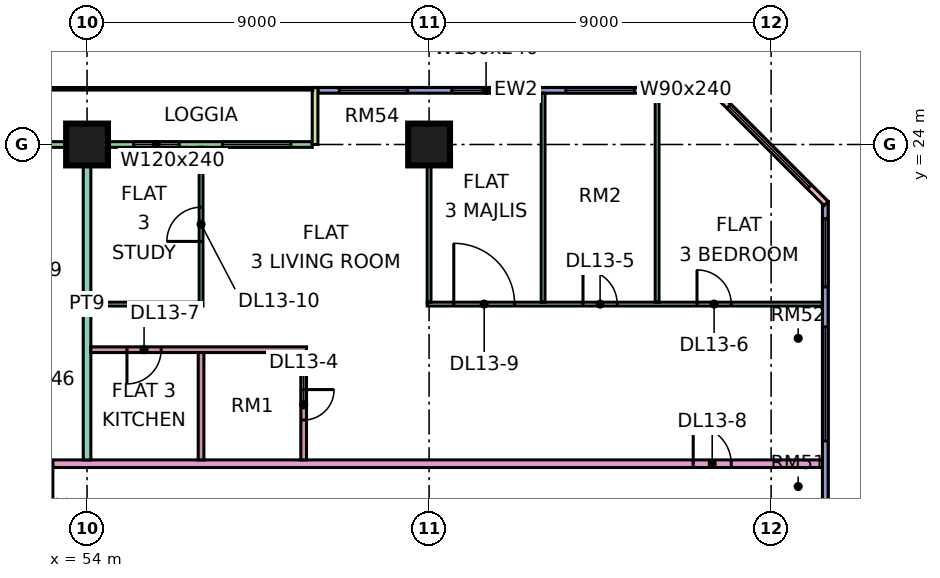
"""IFC4 building model, lengths in metres.
Left out: names, types, materials, properties, quantities, classifications, styles, units other than length and angle.
Written with IfcOpenShell. Run it as: python <this file> out.ifc"""

import sys

from ifc_helpers import new_model, si_unit, direction, frame, frame_2d, origin, origin_2d, place, context, subcontext, project, spatial, rectangle, extrude, element, fill, save


model = new_model("IFC4")
c1 = context("Model", 3, precision=1e-05, world=origin(), true_north=direction((0.0, 1.0)))
c2 = subcontext(c1, "Body", "Model", "MODEL_VIEW")
j1 = project(units=[si_unit("LENGTHUNIT", "METRE"), si_unit("PLANEANGLEUNIT", "RADIAN")], contexts=[c1])
p1 = place(None, origin())
s1 = spatial("IfcSite", under=j1, at=p1, CompositionType="ELEMENT")
p2 = place(p1, origin())
s2 = spatial("IfcBuilding", under=s1, at=p2, CompositionType="ELEMENT")
p3 = place(p2, frame((0.0, 0.0, 63.9)))
s3 = spatial("IfcBuildingStorey", under=s2, at=p3, CompositionType="ELEMENT", Elevation=63.9)
for number, where, z_axis, x_axis in (
    (1, (54.0, 24.0, 0.0), (0.0, 0.0, 1.0), (1.0, 0.0, 0.0)),
    (2, (63.0, 24.0, 0.0), (0.0, 0.0, 1.0), (1.0, 0.0, 0.0)),
):
    element("IfcColumn", number, at=place(p3, frame(where, z_axis=z_axis, x_axis=x_axis)), inside=s3, PredefinedType="COLUMN", context=c2, shape_type="SweptSolid", body=[
        extrude(rectangle(XDim=1.1, YDim=1.1, at=origin_2d()), origin(), (0.0, 0.0, 1.0), 3.75),
    ])
p4 = place(p3, frame((70.5, 25.425, 0.0), z_axis=(0.0, 0.0, 1.0), x_axis=(-1.0, 0.0, 0.0)))
e3 = element("IfcWall", 3, at=p4, inside=s3, PredefinedType="SOLIDWALL", context=c2, shape_type="SweptSolid", body=[
    extrude(rectangle(XDim=10.425, YDim=0.15, at=frame_2d((5.212, 0.0))), origin(), (0.0, 0.0, 1.0), 3.35),
])
p5 = place(p4, frame((0.3, 0.0, 0.45)))
e4 = element("IfcOpeningElement", 4, at=p5, cuts=e3, PredefinedType="OPENING", context=c2, shape_type="SweptSolid", body=[
    extrude(rectangle(XDim=0.9, YDim=2.4, at=frame_2d((0.45, 1.2))), frame((0.0, 0.085, 0.0), z_axis=(0.0, -1.0, 0.0), x_axis=(1.0, 0.0, 0.0)), (0.0, 0.0, 1.0), 0.17),
])
p6 = place(p4, frame((2.1, 0.0, 0.45)))
e5 = element("IfcOpeningElement", 5, at=p6, cuts=e3, PredefinedType="OPENING", context=c2, shape_type="SweptSolid", body=[
    extrude(rectangle(XDim=1.8, YDim=2.4, at=frame_2d((0.9, 1.2))), frame((0.0, 0.085, 0.0), z_axis=(0.0, -1.0, 0.0), x_axis=(1.0, 0.0, 0.0)), (0.0, 0.0, 1.0), 0.17),
])
p7 = place(p4, frame((5.1, 0.0, 0.45)))
e6 = element("IfcOpeningElement", 6, at=p7, cuts=e3, PredefinedType="OPENING", context=c2, shape_type="SweptSolid", body=[
    extrude(rectangle(XDim=1.8, YDim=2.4, at=frame_2d((0.9, 1.2))), frame((0.0, 0.085, 0.0), z_axis=(0.0, -1.0, 0.0), x_axis=(1.0, 0.0, 0.0)), (0.0, 0.0, 1.0), 0.17),
])
p8 = place(p4, frame((8.062, 0.0, 0.45)))
e7 = element("IfcOpeningElement", 7, at=p8, cuts=e3, PredefinedType="OPENING", context=c2, shape_type="SweptSolid", body=[
    extrude(rectangle(XDim=1.8, YDim=2.4, at=frame_2d((0.9, 1.2))), frame((0.0, 0.085, 0.0), z_axis=(0.0, -1.0, 0.0), x_axis=(1.0, 0.0, 0.0)), (0.0, 0.0, 1.0), 0.17),
])
p9 = place(p3, frame((59.925, 24.0, 0.0), z_axis=(0.0, 0.0, 1.0), x_axis=(-1.0, 0.0, 0.0)))
e8 = element("IfcWall", 8, at=p9, inside=s3, PredefinedType="SOLIDWALL", context=c2, shape_type="SweptSolid", body=[
    extrude(rectangle(XDim=11.85, YDim=0.15, at=frame_2d((5.925, 0.0))), origin(), (0.0, 0.0, 1.0), 3.35),
])
p10 = place(p9, frame((0.562, 0.0, 0.45)))
e9 = element("IfcOpeningElement", 9, at=p10, cuts=e8, PredefinedType="OPENING", context=c2, shape_type="SweptSolid", body=[
    extrude(rectangle(XDim=1.8, YDim=2.4, at=frame_2d((0.9, 1.2))), frame((0.0, 0.085, 0.0), z_axis=(0.0, -1.0, 0.0), x_axis=(1.0, 0.0, 0.0)), (0.0, 0.0, 1.0), 0.17),
])
p11 = place(p9, frame((3.5, 0.0, 0.45)))
e10 = element("IfcOpeningElement", 10, at=p11, cuts=e8, PredefinedType="OPENING", context=c2, shape_type="SweptSolid", body=[
    extrude(rectangle(XDim=1.2, YDim=2.4, at=frame_2d((0.6, 1.2))), frame((0.0, 0.085, 0.0), z_axis=(0.0, -1.0, 0.0), x_axis=(1.0, 0.0, 0.0)), (0.0, 0.0, 1.0), 0.17),
])
p12 = place(p9, frame((7.113, 0.0, 0.45)))
e11 = element("IfcOpeningElement", 11, at=p12, cuts=e8, PredefinedType="OPENING", context=c2, shape_type="SweptSolid", body=[
    extrude(rectangle(XDim=4.2, YDim=2.4, at=frame_2d((2.1, 1.2))), frame((0.0, 0.085, 0.0), z_axis=(0.0, -1.0, 0.0), x_axis=(1.0, 0.0, 0.0)), (0.0, 0.0, 1.0), 0.17),
])
p13 = place(p3, frame((60.0, 25.5, 0.0), z_axis=(0.0, 0.0, 1.0), x_axis=(0.0, -1.0, 0.0)))
e12 = element("IfcWall", 12, at=p13, inside=s3, PredefinedType="SOLIDWALL", context=c2, shape_type="SweptSolid", body=[
    extrude(rectangle(XDim=1.5, YDim=0.15, at=frame_2d((0.75, 0.0))), origin(), (0.0, 0.0, 1.0), 3.35),
])
p14 = place(p3, frame((73.425, 12.075, 0.0), z_axis=(0.0, 0.0, 1.0), x_axis=(0.0, 1.0, 0.0)))
e13 = element("IfcWall", 13, at=p14, inside=s3, PredefinedType="SOLIDWALL", context=c2, shape_type="SweptSolid", body=[
    extrude(rectangle(XDim=10.425, YDim=0.15, at=frame_2d((5.212, 0.0))), origin(), (0.0, 0.0, 1.0), 3.35),
])
p15 = place(p14, frame((4.125, 0.0, 0.45)))
e14 = element("IfcOpeningElement", 14, at=p15, cuts=e13, PredefinedType="OPENING", context=c2, shape_type="SweptSolid", body=[
    extrude(rectangle(XDim=3.0, YDim=2.4, at=frame_2d((1.5, 1.2))), frame((0.0, 0.085, 0.0), z_axis=(0.0, -1.0, 0.0), x_axis=(1.0, 0.0, 0.0)), (0.0, 0.0, 1.0), 0.17),
])
p16 = place(p14, frame((8.175, 0.0, 0.45)))
e15 = element("IfcOpeningElement", 15, at=p16, cuts=e13, PredefinedType="OPENING", context=c2, shape_type="SweptSolid", body=[
    extrude(rectangle(XDim=1.8, YDim=2.4, at=frame_2d((0.9, 1.2))), frame((0.0, 0.085, 0.0), z_axis=(0.0, -1.0, 0.0), x_axis=(1.0, 0.0, 0.0)), (0.0, 0.0, 1.0), 0.17),
])
p17 = place(p3, frame((73.447, 22.447, 0.0), z_axis=(0.0, 0.0, 1.0), x_axis=(-0.707106781187, 0.707106781187, 0.0)))
e16 = element("IfcWall", 16, at=p17, inside=s3, PredefinedType="SOLIDWALL", context=c2, shape_type="SweptSolid", body=[
    extrude(rectangle(XDim=4.243, YDim=0.15, at=frame_2d((2.121, 0.0))), origin(), (0.0, 0.0, 1.0), 3.35),
])
p18 = place(p17, frame((0.621, 0.0, 0.45)))
e17 = element("IfcOpeningElement", 17, at=p18, cuts=e16, PredefinedType="OPENING", context=c2, shape_type="SweptSolid", body=[
    extrude(rectangle(XDim=3.0, YDim=2.4, at=frame_2d((1.5, 1.2))), frame((0.0, 0.085, 0.0), z_axis=(0.0, -1.0, 0.0), x_axis=(1.0, 0.0, 0.0)), (0.0, 0.0, 1.0), 0.17),
])
p19 = place(p3, frame((51.225, 15.6, 0.0), z_axis=(0.0, 0.0, 1.0), x_axis=(1.0, 0.0, 0.0)))
e18 = element("IfcWall", 18, at=p19, inside=s3, PredefinedType="PARTITIONING", context=c2, shape_type="SweptSolid", body=[
    extrude(rectangle(XDim=22.125, YDim=0.2, at=frame_2d((11.062, 0.0))), origin(), (0.0, 0.0, 1.0), 3.35),
])
p20 = place(p19, frame((18.725, 0.0, 0.0)))
e19 = element("IfcOpeningElement", 19, at=p20, cuts=e18, PredefinedType="OPENING", context=c2, shape_type="SweptSolid", body=[
    extrude(rectangle(XDim=1.0, YDim=2.1, at=frame_2d((0.5, 1.05))), frame((0.0, 0.11, 0.0), z_axis=(0.0, -1.0, 0.0), x_axis=(1.0, 0.0, 0.0)), (0.0, 0.0, 1.0), 0.22),
])
p21 = place(p19, frame((0.875, 0.0, 0.0)))
e20 = element("IfcOpeningElement", 20, at=p21, cuts=e18, PredefinedType="OPENING", context=c2, shape_type="SweptSolid", body=[
    extrude(rectangle(XDim=1.0, YDim=2.1, at=frame_2d((0.5, 1.05))), frame((0.0, 0.11, 0.0), z_axis=(0.0, -1.0, 0.0), x_axis=(1.0, 0.0, 0.0)), (0.0, 0.0, 1.0), 0.22),
])
p22 = place(p3, frame((54.0, 15.7, 0.0), z_axis=(0.0, 0.0, 1.0), x_axis=(0.0, 1.0, 0.0)))
e21 = element("IfcWall", 21, at=p22, inside=s3, PredefinedType="PARTITIONING", context=c2, shape_type="SweptSolid", body=[
    extrude(rectangle(XDim=8.226, YDim=0.2, at=frame_2d((4.113, 0.0))), origin(), (0.0, 0.0, 1.0), 3.35),
])
p23 = place(p3, frame((54.1, 18.6, 0.0), z_axis=(0.0, 0.0, 1.0), x_axis=(1.0, 0.0, 0.0)))
e22 = element("IfcWall", 22, at=p23, inside=s3, PredefinedType="PARTITIONING", context=c2, shape_type="SweptSolid", body=[
    extrude(rectangle(XDim=5.675, YDim=0.15, at=frame_2d((2.837, 0.0))), origin(), (0.0, 0.0, 1.0), 3.35),
])
p24 = place(p23, frame((0.95, 0.0, 0.0)))
e23 = element("IfcOpeningElement", 23, at=p24, cuts=e22, PredefinedType="OPENING", context=c2, shape_type="SweptSolid", body=[
    extrude(rectangle(XDim=0.9, YDim=2.1, at=frame_2d((0.45, 1.05))), frame((0.0, 0.085, 0.0), z_axis=(0.0, -1.0, 0.0), x_axis=(1.0, 0.0, 0.0)), (0.0, 0.0, 1.0), 0.17),
])
p25 = place(p3, frame((54.1, 19.8, 0.0), z_axis=(0.0, 0.0, 1.0), x_axis=(1.0, 0.0, 0.0)))
e24 = element("IfcWall", 24, at=p25, inside=s3, PredefinedType="PARTITIONING", context=c2, shape_type="SweptSolid", body=[
    extrude(rectangle(XDim=2.85, YDim=0.1, at=frame_2d((1.425, 0.0))), origin(), (0.0, 0.0, 1.0), 3.35),
])
p26 = place(p3, frame((57.0, 15.7, 0.0), z_axis=(0.0, 0.0, 1.0), x_axis=(0.0, 1.0, 0.0)))
e25 = element("IfcWall", 25, at=p26, inside=s3, PredefinedType="PARTITIONING", context=c2, shape_type="SweptSolid", body=[
    extrude(rectangle(XDim=2.825, YDim=0.15, at=frame_2d((1.413, 0.0))), origin(), (0.0, 0.0, 1.0), 3.35),
])
p27 = place(p3, frame((57.0, 19.75, 0.0), z_axis=(0.0, 0.0, 1.0), x_axis=(0.0, 1.0, 0.0)))
e26 = element("IfcWall", 26, at=p27, inside=s3, PredefinedType="PARTITIONING", context=c2, shape_type="SweptSolid", body=[
    extrude(rectangle(XDim=4.176, YDim=0.1, at=frame_2d((2.088, 0.0))), origin(), (0.0, 0.0, 1.0), 3.35),
])
p28 = place(p27, frame((1.7, 0.0, 0.0)))
e27 = element("IfcOpeningElement", 27, at=p28, cuts=e26, PredefinedType="OPENING", context=c2, shape_type="SweptSolid", body=[
    extrude(rectangle(XDim=0.9, YDim=2.1, at=frame_2d((0.45, 1.05))), frame((0.0, 0.06, 0.0), z_axis=(0.0, -1.0, 0.0), x_axis=(1.0, 0.0, 0.0)), (0.0, 0.0, 1.0), 0.12),
])
p29 = place(p3, frame((59.7, 15.7, 0.0), z_axis=(0.0, 0.0, 1.0), x_axis=(0.0, 1.0, 0.0)))
e28 = element("IfcWall", 28, at=p29, inside=s3, PredefinedType="PARTITIONING", context=c2, shape_type="SweptSolid", body=[
    extrude(rectangle(XDim=2.825, YDim=0.15, at=frame_2d((1.413, 0.0))), origin(), (0.0, 0.0, 1.0), 3.35),
])
p30 = place(p29, frame((1.05, 0.0, 0.0)))
e29 = element("IfcOpeningElement", 29, at=p30, cuts=e28, PredefinedType="OPENING", context=c2, shape_type="SweptSolid", body=[
    extrude(rectangle(XDim=0.8, YDim=2.1, at=frame_2d((0.4, 1.05))), frame((0.0, 0.085, 0.0), z_axis=(0.0, -1.0, 0.0), x_axis=(1.0, 0.0, 0.0)), (0.0, 0.0, 1.0), 0.17),
])
p31 = place(p3, frame((62.95, 19.8, 0.0), z_axis=(0.0, 0.0, 1.0), x_axis=(1.0, 0.0, 0.0)))
e30 = element("IfcWall", 30, at=p31, inside=s3, PredefinedType="PARTITIONING", context=c2, shape_type="SweptSolid", body=[
    extrude(rectangle(XDim=10.4, YDim=0.1, at=frame_2d((5.2, 0.0))), origin(), (0.0, 0.0, 1.0), 3.35),
])
p32 = place(p31, frame((4.1, 0.0, 0.0)))
e31 = element("IfcOpeningElement", 31, at=p32, cuts=e30, PredefinedType="OPENING", context=c2, shape_type="SweptSolid", body=[
    extrude(rectangle(XDim=0.9, YDim=2.1, at=frame_2d((0.45, 1.05))), frame((0.0, 0.06, 0.0), z_axis=(0.0, -1.0, 0.0), x_axis=(1.0, 0.0, 0.0)), (0.0, 0.0, 1.0), 0.12),
])
p33 = place(p31, frame((7.1, 0.0, 0.0)))
e32 = element("IfcOpeningElement", 32, at=p33, cuts=e30, PredefinedType="OPENING", context=c2, shape_type="SweptSolid", body=[
    extrude(rectangle(XDim=0.9, YDim=2.1, at=frame_2d((0.45, 1.05))), frame((0.0, 0.06, 0.0), z_axis=(0.0, -1.0, 0.0), x_axis=(1.0, 0.0, 0.0)), (0.0, 0.0, 1.0), 0.12),
])
p34 = place(p31, frame((0.7, 0.0, 0.0)))
e33 = element("IfcOpeningElement", 33, at=p34, cuts=e30, PredefinedType="OPENING", context=c2, shape_type="SweptSolid", body=[
    extrude(rectangle(XDim=1.6, YDim=2.1, at=frame_2d((0.8, 1.05))), frame((0.0, 0.06, 0.0), z_axis=(0.0, -1.0, 0.0), x_axis=(1.0, 0.0, 0.0)), (0.0, 0.0, 1.0), 0.12),
])
p35 = place(p3, frame((63.0, 19.85, 0.0), z_axis=(0.0, 0.0, 1.0), x_axis=(0.0, 1.0, 0.0)))
e34 = element("IfcWall", 34, at=p35, inside=s3, PredefinedType="PARTITIONING", context=c2, shape_type="SweptSolid", body=[
    extrude(rectangle(XDim=4.15, YDim=0.1, at=frame_2d((2.075, 0.0))), origin(), (0.0, 0.0, 1.0), 3.35),
])
for number, where, z_axis, x_axis in (
    (35, (66.0, 19.85, 0.0), (0.0, 0.0, 1.0), (0.0, 1.0, 0.0)),
    (36, (69.0, 19.85, 0.0), (0.0, 0.0, 1.0), (0.0, 1.0, 0.0)),
):
    element("IfcWall", number, at=place(p3, frame(where, z_axis=z_axis, x_axis=x_axis)), inside=s3, PredefinedType="PARTITIONING", context=c2, shape_type="SweptSolid", body=[
        extrude(rectangle(XDim=5.501, YDim=0.1, at=frame_2d((2.75, 0.0))), origin(), (0.0, 0.0, 1.0), 3.35),
    ])
p36 = place(p5, origin())
e37 = element("IfcWindow", 37, at=p36, inside=s3, PartitioningType="SINGLE_PANEL", PredefinedType="WINDOW", context=c2, shape_type="SweptSolid", body=[
    extrude(rectangle(XDim=0.9, YDim=2.4, at=frame_2d((0.45, 1.2))), frame((0.0, 0.03, 0.0), z_axis=(0.0, -1.0, 0.0), x_axis=(1.0, 0.0, 0.0)), (0.0, 0.0, 1.0), 0.06),
])
fill(e4, e37)
p37 = place(p6, origin())
e38 = element("IfcWindow", 38, at=p37, inside=s3, PartitioningType="SINGLE_PANEL", PredefinedType="WINDOW", context=c2, shape_type="SweptSolid", body=[
    extrude(rectangle(XDim=1.8, YDim=2.4, at=frame_2d((0.9, 1.2))), frame((0.0, 0.03, 0.0), z_axis=(0.0, -1.0, 0.0), x_axis=(1.0, 0.0, 0.0)), (0.0, 0.0, 1.0), 0.06),
])
fill(e5, e38)
p38 = place(p7, origin())
e39 = element("IfcWindow", 39, at=p38, inside=s3, PartitioningType="SINGLE_PANEL", PredefinedType="WINDOW", context=c2, shape_type="SweptSolid", body=[
    extrude(rectangle(XDim=1.8, YDim=2.4, at=frame_2d((0.9, 1.2))), frame((0.0, 0.03, 0.0), z_axis=(0.0, -1.0, 0.0), x_axis=(1.0, 0.0, 0.0)), (0.0, 0.0, 1.0), 0.06),
])
fill(e6, e39)
p39 = place(p8, origin())
e40 = element("IfcWindow", 40, at=p39, inside=s3, PartitioningType="SINGLE_PANEL", PredefinedType="WINDOW", context=c2, shape_type="SweptSolid", body=[
    extrude(rectangle(XDim=1.8, YDim=2.4, at=frame_2d((0.9, 1.2))), frame((0.0, 0.03, 0.0), z_axis=(0.0, -1.0, 0.0), x_axis=(1.0, 0.0, 0.0)), (0.0, 0.0, 1.0), 0.06),
])
fill(e7, e40)
p40 = place(p10, origin())
e41 = element("IfcWindow", 41, at=p40, inside=s3, PartitioningType="SINGLE_PANEL", PredefinedType="WINDOW", context=c2, shape_type="SweptSolid", body=[
    extrude(rectangle(XDim=1.8, YDim=2.4, at=frame_2d((0.9, 1.2))), frame((0.0, 0.03, 0.0), z_axis=(0.0, -1.0, 0.0), x_axis=(1.0, 0.0, 0.0)), (0.0, 0.0, 1.0), 0.06),
])
fill(e9, e41)
p41 = place(p11, origin())
e42 = element("IfcWindow", 42, at=p41, inside=s3, PartitioningType="SINGLE_PANEL", PredefinedType="WINDOW", context=c2, shape_type="SweptSolid", body=[
    extrude(rectangle(XDim=1.2, YDim=2.4, at=frame_2d((0.6, 1.2))), frame((0.0, 0.03, 0.0), z_axis=(0.0, -1.0, 0.0), x_axis=(1.0, 0.0, 0.0)), (0.0, 0.0, 1.0), 0.06),
])
fill(e10, e42)
p42 = place(p15, origin())
e43 = element("IfcWindow", 43, at=p42, inside=s3, PartitioningType="SINGLE_PANEL", PredefinedType="WINDOW", context=c2, shape_type="SweptSolid", body=[
    extrude(rectangle(XDim=3.0, YDim=2.4, at=frame_2d((1.5, 1.2))), frame((0.0, 0.03, 0.0), z_axis=(0.0, -1.0, 0.0), x_axis=(1.0, 0.0, 0.0)), (0.0, 0.0, 1.0), 0.06),
])
fill(e14, e43)
p43 = place(p16, origin())
e44 = element("IfcWindow", 44, at=p43, inside=s3, PartitioningType="SINGLE_PANEL", PredefinedType="WINDOW", context=c2, shape_type="SweptSolid", body=[
    extrude(rectangle(XDim=1.8, YDim=2.4, at=frame_2d((0.9, 1.2))), frame((0.0, 0.03, 0.0), z_axis=(0.0, -1.0, 0.0), x_axis=(1.0, 0.0, 0.0)), (0.0, 0.0, 1.0), 0.06),
])
fill(e15, e44)
p44 = place(p18, origin())
e45 = element("IfcWindow", 45, at=p44, inside=s3, PartitioningType="SINGLE_PANEL", PredefinedType="WINDOW", context=c2, shape_type="SweptSolid", body=[
    extrude(rectangle(XDim=3.0, YDim=2.4, at=frame_2d((1.5, 1.2))), frame((0.0, 0.03, 0.0), z_axis=(0.0, -1.0, 0.0), x_axis=(1.0, 0.0, 0.0)), (0.0, 0.0, 1.0), 0.06),
])
fill(e17, e45)
p45 = place(p30, origin())
e46 = element("IfcDoor", 46, at=p45, inside=s3, OperationType="SINGLE_SWING_RIGHT", PredefinedType="DOOR", context=c2, shape_type="SweptSolid", body=[
    extrude(rectangle(XDim=0.8, YDim=2.1, at=frame_2d((0.4, 1.05))), frame((0.0, 0.025, 0.0), z_axis=(0.0, -1.0, 0.0), x_axis=(1.0, 0.0, 0.0)), (0.0, 0.0, 1.0), 0.05),
])
fill(e29, e46)
p46 = place(p32, origin())
e47 = element("IfcDoor", 47, at=p46, inside=s3, OperationType="SINGLE_SWING_LEFT", PredefinedType="DOOR", context=c2, shape_type="SweptSolid", body=[
    extrude(rectangle(XDim=0.9, YDim=2.1, at=frame_2d((0.45, 1.05))), frame((0.0, 0.025, 0.0), z_axis=(0.0, -1.0, 0.0), x_axis=(1.0, 0.0, 0.0)), (0.0, 0.0, 1.0), 0.05),
])
fill(e31, e47)
p47 = place(p33, origin())
e48 = element("IfcDoor", 48, at=p47, inside=s3, OperationType="SINGLE_SWING_LEFT", PredefinedType="DOOR", context=c2, shape_type="SweptSolid", body=[
    extrude(rectangle(XDim=0.9, YDim=2.1, at=frame_2d((0.45, 1.05))), frame((0.0, 0.025, 0.0), z_axis=(0.0, -1.0, 0.0), x_axis=(1.0, 0.0, 0.0)), (0.0, 0.0, 1.0), 0.05),
])
fill(e32, e48)
p48 = place(p24, frame((0.9, 0.0, 0.0), z_axis=(0.0, 0.0, 1.0), x_axis=(-1.0, 0.0, 0.0)))
e49 = element("IfcDoor", 49, at=p48, inside=s3, OperationType="SINGLE_SWING_LEFT", PredefinedType="DOOR", context=c2, shape_type="SweptSolid", body=[
    extrude(rectangle(XDim=0.9, YDim=2.1, at=frame_2d((0.45, 1.05))), frame((0.0, 0.025, 0.0), z_axis=(0.0, -1.0, 0.0), x_axis=(1.0, 0.0, 0.0)), (0.0, 0.0, 1.0), 0.05),
])
fill(e23, e49)
p49 = place(p20, origin())
e50 = element("IfcDoor", 50, at=p49, inside=s3, OperationType="SINGLE_SWING_LEFT", PredefinedType="DOOR", context=c2, shape_type="SweptSolid", body=[
    extrude(rectangle(XDim=1.0, YDim=2.1, at=frame_2d((0.5, 1.05))), frame((0.0, 0.025, 0.0), z_axis=(0.0, -1.0, 0.0), x_axis=(1.0, 0.0, 0.0)), (0.0, 0.0, 1.0), 0.05),
])
fill(e19, e50)
p50 = place(p34, origin())
e51 = element("IfcDoor", 51, at=p50, inside=s3, OperationType="DOUBLE_DOOR_SINGLE_SWING", PredefinedType="DOOR", context=c2, shape_type="SweptSolid", body=[
    extrude(rectangle(XDim=1.6, YDim=2.1, at=frame_2d((0.8, 1.05))), frame((0.0, 0.025, 0.0), z_axis=(0.0, -1.0, 0.0), x_axis=(1.0, 0.0, 0.0)), (0.0, 0.0, 1.0), 0.05),
])
fill(e33, e51)
p51 = place(p28, origin())
e52 = element("IfcDoor", 52, at=p51, inside=s3, OperationType="SINGLE_SWING_LEFT", PredefinedType="DOOR", context=c2, shape_type="SweptSolid", body=[
    extrude(rectangle(XDim=0.9, YDim=2.1, at=frame_2d((0.45, 1.05))), frame((0.0, 0.025, 0.0), z_axis=(0.0, -1.0, 0.0), x_axis=(1.0, 0.0, 0.0)), (0.0, 0.0, 1.0), 0.05),
])
fill(e27, e52)
p52 = place(p21, origin())
e53 = element("IfcDoor", 53, at=p52, inside=s3, OperationType="SINGLE_SWING_RIGHT", PredefinedType="DOOR", context=c2, shape_type="SweptSolid", body=[
    extrude(rectangle(XDim=1.0, YDim=2.1, at=frame_2d((0.5, 1.05))), frame((0.0, 0.025, 0.0), z_axis=(0.0, -1.0, 0.0), x_axis=(1.0, 0.0, 0.0)), (0.0, 0.0, 1.0), 0.05),
])
fill(e20, e53)
save(model, sys.argv[1])
